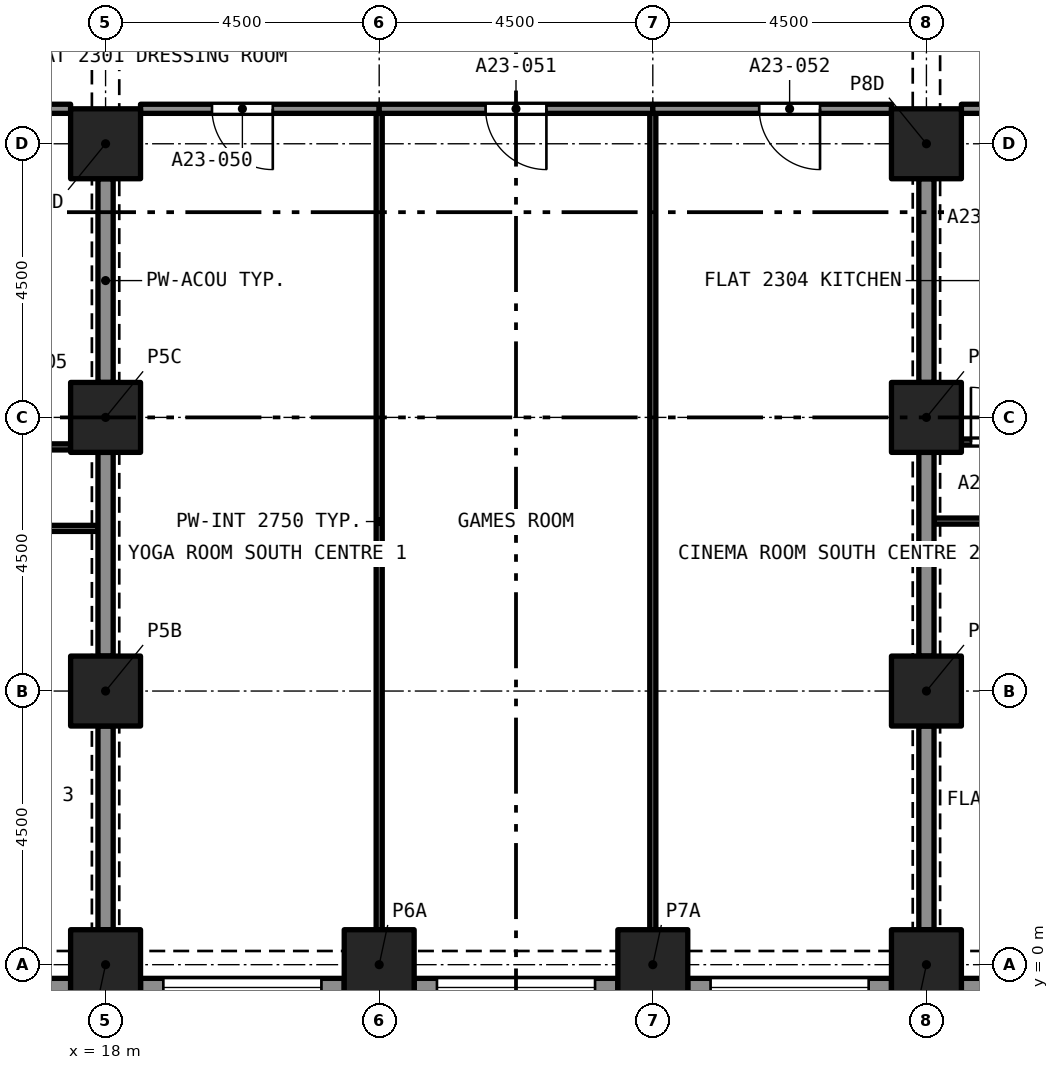
"""IFC4 building model, lengths in metres.
Left out: names, types, materials, properties, quantities, classifications, styles, units other than length and angle.
Written with IfcOpenShell. Run it as: python <this file> out.ifc"""

import sys

from ifc_helpers import new_model, si_unit, direction, frame, frame_2d, origin, origin_2d, place, context, subcontext, project, spatial, rectangle, extrude, element, fill, save


model = new_model("IFC4")
c1 = context("Model", 3, precision=1e-05, world=origin(), true_north=direction((0.0, 1.0)))
c2 = subcontext(c1, "Body", "Model", "MODEL_VIEW")
j1 = project(units=[si_unit("LENGTHUNIT", "METRE"), si_unit("PLANEANGLEUNIT", "RADIAN")], contexts=[c1])
p1 = place(None, origin())
s1 = spatial("IfcSite", under=j1, at=p1, CompositionType="ELEMENT")
p2 = place(p1, origin())
s2 = spatial("IfcBuilding", under=s1, at=p2, CompositionType="ELEMENT")
p3 = place(p2, frame((0.0, 0.0, 86.4)))
s3 = spatial("IfcBuildingStorey", under=s2, at=p3, CompositionType="ELEMENT", Elevation=86.4)
for number, where, z_axis, x_axis in (
    (1, (18.0, 0.0, 0.0), (0.0, 0.0, 1.0), (1.0, 0.0, 0.0)),
    (2, (22.5, 0.0, 0.0), (0.0, 0.0, 1.0), (1.0, 0.0, 0.0)),
    (3, (27.0, 0.0, 0.0), (0.0, 0.0, 1.0), (1.0, 0.0, 0.0)),
    (4, (31.5, 0.0, 0.0), (0.0, 0.0, 1.0), (1.0, 0.0, 0.0)),
    (5, (18.0, 4.5, 0.0), (0.0, 0.0, 1.0), (1.0, 0.0, 0.0)),
    (6, (31.5, 4.5, 0.0), (0.0, 0.0, 1.0), (1.0, 0.0, 0.0)),
    (7, (18.0, 9.0, 0.0), (0.0, 0.0, 1.0), (1.0, 0.0, 0.0)),
    (8, (31.5, 9.0, 0.0), (0.0, 0.0, 1.0), (1.0, 0.0, 0.0)),
    (9, (18.0, 13.5, 0.0), (0.0, 0.0, 1.0), (1.0, 0.0, 0.0)),
    (10, (31.5, 13.5, 0.0), (0.0, 0.0, 1.0), (1.0, 0.0, 0.0)),
):
    element("IfcColumn", number, at=place(p3, frame(where, z_axis=z_axis, x_axis=x_axis)), inside=s3, PredefinedType="COLUMN", context=c2, shape_type="SweptSolid", body=[
        extrude(rectangle(XDim=1.15, YDim=1.15, at=origin_2d()), origin(), (0.0, 0.0, 1.0), 3.2),
    ])
p4 = place(p3, frame((17.425, -0.375, 0.0), z_axis=(0.0, 0.0, 1.0), x_axis=(-1.0, 0.0, 0.0)))
e11 = element("IfcWall", 11, at=p4, inside=s3, PredefinedType="SOLIDWALL", context=c2, shape_type="SweptSolid", body=[
    extrude(rectangle(XDim=3.35, YDim=0.3, at=frame_2d((1.675, 0.0))), origin(), (0.0, 0.0, 1.0), 3.2),
])
p5 = place(p4, frame((0.375, 0.0, 0.45)))
e12 = element("IfcOpeningElement", 12, at=p5, cuts=e11, PredefinedType="OPENING", context=c2, shape_type="SweptSolid", body=[
    extrude(rectangle(XDim=2.6, YDim=1.95, at=frame_2d((1.3, 0.975))), frame((0.0, 0.16, 0.0), z_axis=(0.0, -1.0, 0.0), x_axis=(1.0, 0.0, 0.0)), (0.0, 0.0, 1.0), 0.32),
])
p6 = place(p3, frame((21.925, -0.375, 0.0), z_axis=(0.0, 0.0, 1.0), x_axis=(-1.0, 0.0, 0.0)))
e13 = element("IfcWall", 13, at=p6, inside=s3, PredefinedType="SOLIDWALL", context=c2, shape_type="SweptSolid", body=[
    extrude(rectangle(XDim=3.35, YDim=0.3, at=frame_2d((1.675, 0.0))), origin(), (0.0, 0.0, 1.0), 3.2),
])
p7 = place(p6, frame((0.375, 0.0, 0.45)))
e14 = element("IfcOpeningElement", 14, at=p7, cuts=e13, PredefinedType="OPENING", context=c2, shape_type="SweptSolid", body=[
    extrude(rectangle(XDim=2.6, YDim=1.95, at=frame_2d((1.3, 0.975))), frame((0.0, 0.16, 0.0), z_axis=(0.0, -1.0, 0.0), x_axis=(1.0, 0.0, 0.0)), (0.0, 0.0, 1.0), 0.32),
])
p8 = place(p3, frame((26.425, -0.375, 0.0), z_axis=(0.0, 0.0, 1.0), x_axis=(-1.0, 0.0, 0.0)))
e15 = element("IfcWall", 15, at=p8, inside=s3, PredefinedType="SOLIDWALL", context=c2, shape_type="SweptSolid", body=[
    extrude(rectangle(XDim=3.35, YDim=0.3, at=frame_2d((1.675, 0.0))), origin(), (0.0, 0.0, 1.0), 3.2),
])
p9 = place(p8, frame((0.375, 0.0, 0.45)))
e16 = element("IfcOpeningElement", 16, at=p9, cuts=e15, PredefinedType="OPENING", context=c2, shape_type="SweptSolid", body=[
    extrude(rectangle(XDim=2.6, YDim=1.95, at=frame_2d((1.3, 0.975))), frame((0.0, 0.16, 0.0), z_axis=(0.0, -1.0, 0.0), x_axis=(1.0, 0.0, 0.0)), (0.0, 0.0, 1.0), 0.32),
])
p10 = place(p3, frame((30.925, -0.375, 0.0), z_axis=(0.0, 0.0, 1.0), x_axis=(-1.0, 0.0, 0.0)))
e17 = element("IfcWall", 17, at=p10, inside=s3, PredefinedType="SOLIDWALL", context=c2, shape_type="SweptSolid", body=[
    extrude(rectangle(XDim=3.35, YDim=0.3, at=frame_2d((1.675, 0.0))), origin(), (0.0, 0.0, 1.0), 3.2),
])
p11 = place(p10, frame((0.375, 0.0, 0.45)))
e18 = element("IfcOpeningElement", 18, at=p11, cuts=e17, PredefinedType="OPENING", context=c2, shape_type="SweptSolid", body=[
    extrude(rectangle(XDim=2.6, YDim=1.95, at=frame_2d((1.3, 0.975))), frame((0.0, 0.16, 0.0), z_axis=(0.0, -1.0, 0.0), x_axis=(1.0, 0.0, 0.0)), (0.0, 0.0, 1.0), 0.32),
])
p12 = place(p3, frame((35.425, -0.375, 0.0), z_axis=(0.0, 0.0, 1.0), x_axis=(-1.0, 0.0, 0.0)))
e19 = element("IfcWall", 19, at=p12, inside=s3, PredefinedType="SOLIDWALL", context=c2, shape_type="SweptSolid", body=[
    extrude(rectangle(XDim=3.35, YDim=0.3, at=frame_2d((1.675, 0.0))), origin(), (0.0, 0.0, 1.0), 3.2),
])
p13 = place(p12, frame((0.375, 0.0, 0.45)))
e20 = element("IfcOpeningElement", 20, at=p13, cuts=e19, PredefinedType="OPENING", context=c2, shape_type="SweptSolid", body=[
    extrude(rectangle(XDim=2.6, YDim=1.95, at=frame_2d((1.3, 0.975))), frame((0.0, 0.16, 0.0), z_axis=(0.0, -1.0, 0.0), x_axis=(1.0, 0.0, 0.0)), (0.0, 0.0, 1.0), 0.32),
])
p14 = place(p3, frame((11.85, 14.075, 0.0), z_axis=(0.0, 0.0, 1.0), x_axis=(1.0, 0.0, 0.0)))
e21 = element("IfcWall", 21, at=p14, inside=s3, PredefinedType="PARTITIONING", context=c2, shape_type="SweptSolid", body=[
    extrude(rectangle(XDim=5.575, YDim=0.15, at=frame_2d((2.788, 0.0))), origin(), (0.0, 0.0, 1.0), 2.9),
])
p15 = place(p3, frame((17.875, 7.175, 0.0), z_axis=(0.0, 0.0, 1.0), x_axis=(-1.0, 0.0, 0.0)))
e22 = element("IfcWall", 22, at=p15, inside=s3, PredefinedType="PARTITIONING", context=c2, shape_type="SweptSolid", body=[
    extrude(rectangle(XDim=4.375, YDim=0.1, at=frame_2d((2.188, 0.0))), origin(), (0.0, 0.0, 1.0), 2.9),
])
p16 = place(p15, frame((1.675, 0.0, 0.0)))
e23 = element("IfcOpeningElement", 23, at=p16, cuts=e22, PredefinedType="OPENING", context=c2, shape_type="SweptSolid", body=[
    extrude(rectangle(XDim=0.9, YDim=2.1, at=frame_2d((0.45, 1.05))), frame((0.0, 0.06, 0.0), z_axis=(0.0, -1.0, 0.0), x_axis=(1.0, 0.0, 0.0)), (0.0, 0.0, 1.0), 0.12),
])
for number, where, z_axis, x_axis in (
    (24, (18.0, 5.075, 0.0), (0.0, 0.0, 1.0), (0.0, 1.0, 0.0)),
    (25, (18.0, 0.575, 0.0), (0.0, 0.0, 1.0), (0.0, 1.0, 0.0)),
):
    element("IfcWall", number, at=place(p3, frame(where, z_axis=z_axis, x_axis=x_axis)), inside=s3, PredefinedType="PARTITIONING", context=c2, shape_type="SweptSolid", body=[
        extrude(rectangle(XDim=3.35, YDim=0.25, at=frame_2d((1.675, 0.0))), origin(), (0.0, 0.0, 1.0), 2.38),
    ])
p17 = place(p3, frame((15.402, 8.515, 0.0), z_axis=(0.0, 0.0, 1.0), x_axis=(1.0, 0.0, 0.0)))
e26 = element("IfcWall", 26, at=p17, inside=s3, PredefinedType="PARTITIONING", context=c2, shape_type="SweptSolid", body=[
    extrude(rectangle(XDim=2.023, YDim=0.1, at=frame_2d((1.012, 0.0))), origin(), (0.0, 0.0, 1.0), 2.9),
])
p18 = place(p17, frame((0.899, 0.0, 0.0)))
e27 = element("IfcOpeningElement", 27, at=p18, cuts=e26, PredefinedType="OPENING", context=c2, shape_type="SweptSolid", body=[
    extrude(rectangle(XDim=0.8, YDim=2.1, at=frame_2d((0.4, 1.05))), frame((0.0, 0.06, 0.0), z_axis=(0.0, -1.0, 0.0), x_axis=(1.0, 0.0, 0.0)), (0.0, 0.0, 1.0), 0.12),
])
p19 = place(p3, frame((18.0, 9.575, 0.0), z_axis=(0.0, 0.0, 1.0), x_axis=(0.0, 1.0, 0.0)))
e28 = element("IfcWall", 28, at=p19, inside=s3, PredefinedType="PARTITIONING", context=c2, shape_type="SweptSolid", body=[
    extrude(rectangle(XDim=3.35, YDim=0.25, at=frame_2d((1.675, 0.0))), origin(), (0.0, 0.0, 1.0), 2.38),
])
p20 = place(p3, frame((32.075, 8.595, 0.0), z_axis=(0.0, 0.0, 1.0), x_axis=(1.0, 0.0, 0.0)))
e29 = element("IfcWall", 29, at=p20, inside=s3, PredefinedType="PARTITIONING", context=c2, shape_type="SweptSolid", body=[
    extrude(rectangle(XDim=1.79, YDim=0.1, at=frame_2d((0.895, 0.0))), origin(), (0.0, 0.0, 1.0), 2.9),
])
p21 = place(p20, frame((0.157, 0.0, 0.0)))
e30 = element("IfcOpeningElement", 30, at=p21, cuts=e29, PredefinedType="OPENING", context=c2, shape_type="SweptSolid", body=[
    extrude(rectangle(XDim=0.9, YDim=2.1, at=frame_2d((0.45, 1.05))), frame((0.0, 0.06, 0.0), z_axis=(0.0, -1.0, 0.0), x_axis=(1.0, 0.0, 0.0)), (0.0, 0.0, 1.0), 0.12),
])
p22 = place(p3, frame((36.0, 7.295, 0.0), z_axis=(0.0, 0.0, 1.0), x_axis=(-1.0, 0.0, 0.0)))
e31 = element("IfcWall", 31, at=p22, inside=s3, PredefinedType="PARTITIONING", context=c2, shape_type="SweptSolid", body=[
    extrude(rectangle(XDim=4.375, YDim=0.1, at=frame_2d((2.188, 0.0))), origin(), (0.0, 0.0, 1.0), 2.9),
])
p23 = place(p22, frame((1.75, 0.0, 0.0)))
e32 = element("IfcOpeningElement", 32, at=p23, cuts=e31, PredefinedType="OPENING", context=c2, shape_type="SweptSolid", body=[
    extrude(rectangle(XDim=1.0, YDim=2.1, at=frame_2d((0.5, 1.05))), frame((0.0, 0.06, 0.0), z_axis=(0.0, -1.0, 0.0), x_axis=(1.0, 0.0, 0.0)), (0.0, 0.0, 1.0), 0.12),
])
p24 = place(p3, frame((31.5, 9.575, 0.0), z_axis=(0.0, 0.0, 1.0), x_axis=(0.0, 1.0, 0.0)))
e33 = element("IfcWall", 33, at=p24, inside=s3, PredefinedType="PARTITIONING", context=c2, shape_type="SweptSolid", body=[
    extrude(rectangle(XDim=3.35, YDim=0.25, at=frame_2d((1.675, 0.0))), origin(), (0.0, 0.0, 1.0), 2.38),
])
p25 = place(p3, frame((32.075, 14.075, 0.0), z_axis=(0.0, 0.0, 1.0), x_axis=(1.0, 0.0, 0.0)))
e34 = element("IfcWall", 34, at=p25, inside=s3, PredefinedType="PARTITIONING", context=c2, shape_type="SweptSolid", body=[
    extrude(rectangle(XDim=3.325, YDim=0.15, at=frame_2d((1.663, 0.0))), origin(), (0.0, 0.0, 1.0), 2.9),
])
for number, where, z_axis, x_axis in (
    (35, (31.5, 0.575, 0.0), (0.0, 0.0, 1.0), (0.0, 1.0, 0.0)),
    (36, (31.5, 5.075, 0.0), (0.0, 0.0, 1.0), (0.0, 1.0, 0.0)),
):
    element("IfcWall", number, at=place(p3, frame(where, z_axis=z_axis, x_axis=x_axis)), inside=s3, PredefinedType="PARTITIONING", context=c2, shape_type="SweptSolid", body=[
        extrude(rectangle(XDim=3.35, YDim=0.25, at=frame_2d((1.675, 0.0))), origin(), (0.0, 0.0, 1.0), 2.38),
    ])
p26 = place(p3, frame((22.5, 0.575, 0.0), z_axis=(0.0, 0.0, 1.0), x_axis=(0.0, 1.0, 0.0)))
e37 = element("IfcWall", 37, at=p26, inside=s3, PredefinedType="PARTITIONING", context=c2, shape_type="SweptSolid", body=[
    extrude(rectangle(XDim=13.425, YDim=0.1, at=frame_2d((6.712, 0.0))), origin(), (0.0, 0.0, 1.0), 2.75),
])
p27 = place(p3, frame((22.5, 14.075, 0.0), z_axis=(0.0, 0.0, 1.0), x_axis=(-1.0, 0.0, 0.0)))
e38 = element("IfcWall", 38, at=p27, inside=s3, PredefinedType="PARTITIONING", context=c2, shape_type="SweptSolid", body=[
    extrude(rectangle(XDim=3.925, YDim=0.15, at=frame_2d((1.962, 0.0))), origin(), (0.0, 0.0, 1.0), 2.75),
])
p28 = place(p27, frame((1.75, 0.0, 0.0)))
e39 = element("IfcOpeningElement", 39, at=p28, cuts=e38, PredefinedType="OPENING", context=c2, shape_type="SweptSolid", body=[
    extrude(rectangle(XDim=1.0, YDim=2.1, at=frame_2d((0.5, 1.05))), frame((0.0, 0.085, 0.0), z_axis=(0.0, -1.0, 0.0), x_axis=(1.0, 0.0, 0.0)), (0.0, 0.0, 1.0), 0.17),
])
p29 = place(p3, frame((27.0, 0.575, 0.0), z_axis=(0.0, 0.0, 1.0), x_axis=(0.0, 1.0, 0.0)))
e40 = element("IfcWall", 40, at=p29, inside=s3, PredefinedType="PARTITIONING", context=c2, shape_type="SweptSolid", body=[
    extrude(rectangle(XDim=13.425, YDim=0.1, at=frame_2d((6.712, 0.0))), origin(), (0.0, 0.0, 1.0), 2.75),
])
p30 = place(p3, frame((27.0, 14.075, 0.0), z_axis=(0.0, 0.0, 1.0), x_axis=(-1.0, 0.0, 0.0)))
e41 = element("IfcWall", 41, at=p30, inside=s3, PredefinedType="PARTITIONING", context=c2, shape_type="SweptSolid", body=[
    extrude(rectangle(XDim=4.5, YDim=0.15, at=frame_2d((2.25, 0.0))), origin(), (0.0, 0.0, 1.0), 2.75),
])
p31 = place(p30, frame((1.75, 0.0, 0.0)))
e42 = element("IfcOpeningElement", 42, at=p31, cuts=e41, PredefinedType="OPENING", context=c2, shape_type="SweptSolid", body=[
    extrude(rectangle(XDim=1.0, YDim=2.1, at=frame_2d((0.5, 1.05))), frame((0.0, 0.085, 0.0), z_axis=(0.0, -1.0, 0.0), x_axis=(1.0, 0.0, 0.0)), (0.0, 0.0, 1.0), 0.17),
])
p32 = place(p3, frame((30.925, 14.075, 0.0), z_axis=(0.0, 0.0, 1.0), x_axis=(-1.0, 0.0, 0.0)))
e43 = element("IfcWall", 43, at=p32, inside=s3, PredefinedType="PARTITIONING", context=c2, shape_type="SweptSolid", body=[
    extrude(rectangle(XDim=3.925, YDim=0.15, at=frame_2d((1.962, 0.0))), origin(), (0.0, 0.0, 1.0), 2.75),
])
p33 = place(p32, frame((1.175, 0.0, 0.0)))
e44 = element("IfcOpeningElement", 44, at=p33, cuts=e43, PredefinedType="OPENING", context=c2, shape_type="SweptSolid", body=[
    extrude(rectangle(XDim=1.0, YDim=2.1, at=frame_2d((0.5, 1.05))), frame((0.0, 0.085, 0.0), z_axis=(0.0, -1.0, 0.0), x_axis=(1.0, 0.0, 0.0)), (0.0, 0.0, 1.0), 0.17),
])
p34 = place(p7, origin())
e45 = element("IfcWindow", 45, at=p34, inside=s3, PartitioningType="SINGLE_PANEL", PredefinedType="WINDOW", context=c2, shape_type="SweptSolid", body=[
    extrude(rectangle(XDim=2.6, YDim=1.95, at=frame_2d((1.3, 0.975))), frame((0.0, 0.03, 0.0), z_axis=(0.0, -1.0, 0.0), x_axis=(1.0, 0.0, 0.0)), (0.0, 0.0, 1.0), 0.06),
])
fill(e14, e45)
p35 = place(p9, origin())
e46 = element("IfcWindow", 46, at=p35, inside=s3, PartitioningType="SINGLE_PANEL", PredefinedType="WINDOW", context=c2, shape_type="SweptSolid", body=[
    extrude(rectangle(XDim=2.6, YDim=1.95, at=frame_2d((1.3, 0.975))), frame((0.0, 0.03, 0.0), z_axis=(0.0, -1.0, 0.0), x_axis=(1.0, 0.0, 0.0)), (0.0, 0.0, 1.0), 0.06),
])
fill(e16, e46)
p36 = place(p11, origin())
e47 = element("IfcWindow", 47, at=p36, inside=s3, PartitioningType="SINGLE_PANEL", PredefinedType="WINDOW", context=c2, shape_type="SweptSolid", body=[
    extrude(rectangle(XDim=2.6, YDim=1.95, at=frame_2d((1.3, 0.975))), frame((0.0, 0.03, 0.0), z_axis=(0.0, -1.0, 0.0), x_axis=(1.0, 0.0, 0.0)), (0.0, 0.0, 1.0), 0.06),
])
fill(e18, e47)
p37 = place(p21, origin())
e48 = element("IfcDoor", 48, at=p37, inside=s3, OperationType="SINGLE_SWING_LEFT", PredefinedType="DOOR", context=c2, shape_type="SweptSolid", body=[
    extrude(rectangle(XDim=0.9, YDim=2.1, at=frame_2d((0.45, 1.05))), frame((0.0, 0.025, 0.0), z_axis=(0.0, -1.0, 0.0), x_axis=(1.0, 0.0, 0.0)), (0.0, 0.0, 1.0), 0.05),
])
fill(e30, e48)
p38 = place(p28, origin())
e49 = element("IfcDoor", 49, at=p38, inside=s3, OperationType="SINGLE_SWING_RIGHT", PredefinedType="DOOR", context=c2, shape_type="SweptSolid", body=[
    extrude(rectangle(XDim=1.0, YDim=2.1, at=frame_2d((0.5, 1.05))), frame((0.0, 0.025, 0.0), z_axis=(0.0, -1.0, 0.0), x_axis=(1.0, 0.0, 0.0)), (0.0, 0.0, 1.0), 0.05),
])
fill(e39, e49)
p39 = place(p31, origin())
e50 = element("IfcDoor", 50, at=p39, inside=s3, OperationType="SINGLE_SWING_RIGHT", PredefinedType="DOOR", context=c2, shape_type="SweptSolid", body=[
    extrude(rectangle(XDim=1.0, YDim=2.1, at=frame_2d((0.5, 1.05))), frame((0.0, 0.025, 0.0), z_axis=(0.0, -1.0, 0.0), x_axis=(1.0, 0.0, 0.0)), (0.0, 0.0, 1.0), 0.05),
])
fill(e42, e50)
p40 = place(p33, origin())
e51 = element("IfcDoor", 51, at=p40, inside=s3, OperationType="SINGLE_SWING_LEFT", PredefinedType="DOOR", context=c2, shape_type="SweptSolid", body=[
    extrude(rectangle(XDim=1.0, YDim=2.1, at=frame_2d((0.5, 1.05))), frame((0.0, 0.025, 0.0), z_axis=(0.0, -1.0, 0.0), x_axis=(1.0, 0.0, 0.0)), (0.0, 0.0, 1.0), 0.05),
])
fill(e44, e51)
save(model, sys.argv[1])
